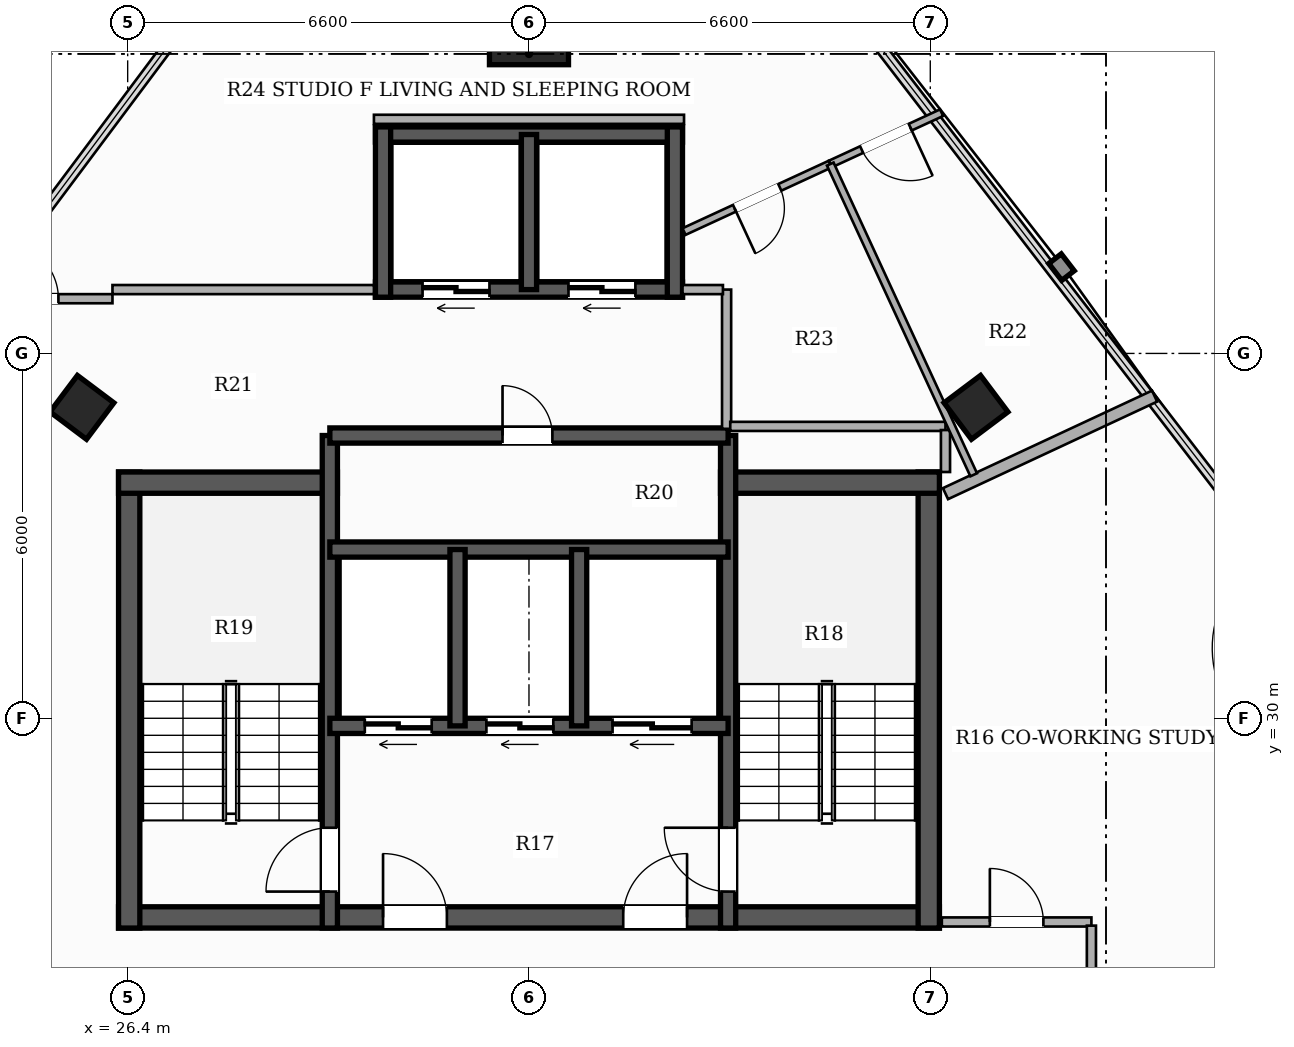
"""IFC4 building model, lengths in metres.
Left out: names, types, materials, properties, quantities, classifications, styles, units other than length and angle.
Written with IfcOpenShell. Run it as: python <this file> out.ifc"""

import sys

from ifc_helpers import new_model, si_unit, direction, frame, frame_2d, origin, origin_2d, place, context, subcontext, project, spatial, rectangle, hollow_rectangle, extrude, element, fill, save


model = new_model("IFC4")
c1 = context("Model", 3, precision=1e-05, world=origin(), true_north=direction((0.0, 1.0)))
c2 = subcontext(c1, "Body", "Model", "MODEL_VIEW")
j1 = project(units=[si_unit("LENGTHUNIT", "METRE"), si_unit("PLANEANGLEUNIT", "RADIAN")], contexts=[c1])
p1 = place(None, origin())
s1 = spatial("IfcSite", under=j1, at=p1, CompositionType="ELEMENT")
p2 = place(p1, origin())
s2 = spatial("IfcBuilding", under=s1, at=p2, CompositionType="ELEMENT")
p3 = place(p2, frame((0.0, 0.0, 196.4)))
s3 = spatial("IfcBuildingStorey", under=s2, at=p3, CompositionType="ELEMENT", Elevation=196.4)
p4 = place(p3, frame((26.25, 26.725, 0.0), z_axis=(0.0, 0.0, 1.0), x_axis=(1.0, 0.0, 0.0)))
e1 = element("IfcWall", 1, at=p4, inside=s3, PredefinedType="SHEAR", context=c2, shape_type="SweptSolid", body=[
    extrude(rectangle(XDim=13.5, YDim=0.35, at=frame_2d((6.75, 0.0))), origin(), (0.0, 0.0, 1.0), 3.3),
])
p5 = place(p4, frame((4.35, 0.0, 0.0)))
e2 = element("IfcOpeningElement", 2, at=p5, cuts=e1, PredefinedType="OPENING", context=c2, shape_type="SweptSolid", body=[
    extrude(rectangle(XDim=1.05, YDim=2.15, at=frame_2d((0.525, 1.075))), frame((0.0, 0.185, 0.0), z_axis=(0.0, -1.0, 0.0), x_axis=(1.0, 0.0, 0.0)), (0.0, 0.0, 1.0), 0.37),
])
p6 = place(p4, frame((8.3, 0.0, 0.0)))
e3 = element("IfcOpeningElement", 3, at=p6, cuts=e1, PredefinedType="OPENING", context=c2, shape_type="SweptSolid", body=[
    extrude(rectangle(XDim=1.05, YDim=2.15, at=frame_2d((0.525, 1.075))), frame((0.0, 0.185, 0.0), z_axis=(0.0, -1.0, 0.0), x_axis=(1.0, 0.0, 0.0)), (0.0, 0.0, 1.0), 0.37),
])
p7 = place(p3, frame((26.425, 26.55, 0.0), z_axis=(0.0, 0.0, 1.0), x_axis=(0.0, 1.0, 0.0)))
e4 = element("IfcWall", 4, at=p7, inside=s3, PredefinedType="SHEAR", context=c2, shape_type="SweptSolid", body=[
    extrude(rectangle(XDim=7.5, YDim=0.35, at=frame_2d((3.75, 0.0))), origin(), (0.0, 0.0, 1.0), 3.3),
])
p8 = place(p3, frame((26.25, 33.875, 0.0), z_axis=(0.0, 0.0, 1.0), x_axis=(1.0, 0.0, 0.0)))
e5 = element("IfcWall", 5, at=p8, inside=s3, PredefinedType="SHEAR", context=c2, shape_type="SweptSolid", body=[
    extrude(rectangle(XDim=3.6, YDim=0.35, at=frame_2d((1.8, 0.0))), origin(), (0.0, 0.0, 1.0), 3.3),
])
p9 = place(p3, frame((39.575, 26.55, 0.0), z_axis=(0.0, 0.0, 1.0), x_axis=(0.0, 1.0, 0.0)))
e6 = element("IfcWall", 6, at=p9, inside=s3, PredefinedType="SHEAR", context=c2, shape_type="SweptSolid", body=[
    extrude(rectangle(XDim=7.5, YDim=0.35, at=frame_2d((3.75, 0.0))), origin(), (0.0, 0.0, 1.0), 3.3),
])
p10 = place(p3, frame((36.15, 33.875, 0.0), z_axis=(0.0, 0.0, 1.0), x_axis=(1.0, 0.0, 0.0)))
e7 = element("IfcWall", 7, at=p10, inside=s3, PredefinedType="SHEAR", context=c2, shape_type="SweptSolid", body=[
    extrude(rectangle(XDim=3.6, YDim=0.35, at=frame_2d((1.8, 0.0))), origin(), (0.0, 0.0, 1.0), 3.3),
])
p11 = place(p3, frame((29.725, 26.55, 0.0), z_axis=(0.0, 0.0, 1.0), x_axis=(0.0, 1.0, 0.0)))
e8 = element("IfcWall", 8, at=p11, inside=s3, PredefinedType="SHEAR", context=c2, shape_type="SweptSolid", body=[
    extrude(rectangle(XDim=8.1, YDim=0.25, at=frame_2d((4.05, 0.0))), origin(), (0.0, 0.0, 1.0), 3.3),
])
p12 = place(p11, frame((0.6, 0.0, 0.0)))
e9 = element("IfcOpeningElement", 9, at=p12, cuts=e8, PredefinedType="OPENING", context=c2, shape_type="SweptSolid", body=[
    extrude(rectangle(XDim=1.05, YDim=2.15, at=frame_2d((0.525, 1.075))), frame((0.0, 0.135, 0.0), z_axis=(0.0, -1.0, 0.0), x_axis=(1.0, 0.0, 0.0)), (0.0, 0.0, 1.0), 0.27),
])
p13 = place(p3, frame((36.275, 26.55, 0.0), z_axis=(0.0, 0.0, 1.0), x_axis=(0.0, 1.0, 0.0)))
e10 = element("IfcWall", 10, at=p13, inside=s3, PredefinedType="SHEAR", context=c2, shape_type="SweptSolid", body=[
    extrude(rectangle(XDim=8.1, YDim=0.25, at=frame_2d((4.05, 0.0))), origin(), (0.0, 0.0, 1.0), 3.3),
])
p14 = place(p13, frame((0.6, 0.0, 0.0)))
e11 = element("IfcOpeningElement", 11, at=p14, cuts=e10, PredefinedType="OPENING", context=c2, shape_type="SweptSolid", body=[
    extrude(rectangle(XDim=1.05, YDim=2.15, at=frame_2d((0.525, 1.075))), frame((0.0, 0.135, 0.0), z_axis=(0.0, -1.0, 0.0), x_axis=(1.0, 0.0, 0.0)), (0.0, 0.0, 1.0), 0.27),
])
p15 = place(p3, frame((36.275, 29.875, 0.0), z_axis=(0.0, 0.0, 1.0), x_axis=(-1.0, 0.0, 0.0)))
e12 = element("IfcWall", 12, at=p15, inside=s3, PredefinedType="SHEAR", context=c2, shape_type="SweptSolid", body=[
    extrude(rectangle(XDim=6.55, YDim=0.25, at=frame_2d((3.275, 0.0))), origin(), (0.0, 0.0, 1.0), 3.3),
])
p16 = place(p15, frame((4.875, 0.0, 0.0)))
e13 = element("IfcOpeningElement", 13, at=p16, cuts=e12, PredefinedType="OPENING", context=c2, shape_type="SweptSolid", body=[
    extrude(rectangle(XDim=1.1, YDim=2.2, at=frame_2d((0.55, 1.1))), frame((0.0, 0.135, 0.0), z_axis=(0.0, -1.0, 0.0), x_axis=(1.0, 0.0, 0.0)), (0.0, 0.0, 1.0), 0.27),
])
p17 = place(p15, frame((2.875, 0.0, 0.0)))
e14 = element("IfcOpeningElement", 14, at=p17, cuts=e12, PredefinedType="OPENING", context=c2, shape_type="SweptSolid", body=[
    extrude(rectangle(XDim=1.1, YDim=2.2, at=frame_2d((0.55, 1.1))), frame((0.0, 0.135, 0.0), z_axis=(0.0, -1.0, 0.0), x_axis=(1.0, 0.0, 0.0)), (0.0, 0.0, 1.0), 0.27),
])
p18 = place(p15, frame((0.6, 0.0, 0.0)))
e15 = element("IfcOpeningElement", 15, at=p18, cuts=e12, PredefinedType="OPENING", context=c2, shape_type="SweptSolid", body=[
    extrude(rectangle(XDim=1.3, YDim=2.2, at=frame_2d((0.65, 1.1))), frame((0.0, 0.135, 0.0), z_axis=(0.0, -1.0, 0.0), x_axis=(1.0, 0.0, 0.0)), (0.0, 0.0, 1.0), 0.27),
])
p19 = place(p3, frame((29.725, 32.775, 0.0), z_axis=(0.0, 0.0, 1.0), x_axis=(1.0, 0.0, 0.0)))
e16 = element("IfcWall", 16, at=p19, inside=s3, PredefinedType="SHEAR", context=c2, shape_type="SweptSolid", body=[
    extrude(rectangle(XDim=6.55, YDim=0.25, at=frame_2d((3.275, 0.0))), origin(), (0.0, 0.0, 1.0), 3.3),
])
for number, where, z_axis, x_axis in (
    (17, (31.825, 29.875, 0.0), (0.0, 0.0, 1.0), (0.0, 1.0, 0.0)),
    (18, (33.825, 29.875, 0.0), (0.0, 0.0, 1.0), (0.0, 1.0, 0.0)),
):
    element("IfcWall", number, at=place(p3, frame(where, z_axis=z_axis, x_axis=x_axis)), inside=s3, PredefinedType="SHEAR", context=c2, shape_type="SweptSolid", body=[
        extrude(rectangle(XDim=2.9, YDim=0.25, at=frame_2d((1.45, 0.0))), origin(), (0.0, 0.0, 1.0), 3.3),
    ])
p20 = place(p3, frame((29.725, 34.65, 0.0), z_axis=(0.0, 0.0, 1.0), x_axis=(1.0, 0.0, 0.0)))
e19 = element("IfcWall", 19, at=p20, inside=s3, PredefinedType="SHEAR", context=c2, shape_type="SweptSolid", body=[
    extrude(rectangle(XDim=6.55, YDim=0.25, at=frame_2d((3.275, 0.0))), origin(), (0.0, 0.0, 1.0), 3.3),
])
p21 = place(p20, frame((2.84, 0.0, 0.0)))
e20 = element("IfcOpeningElement", 20, at=p21, cuts=e19, PredefinedType="OPENING", context=c2, shape_type="SweptSolid", body=[
    extrude(rectangle(XDim=0.82, YDim=2.1, at=frame_2d((0.41, 1.05))), frame((0.0, 0.135, 0.0), z_axis=(0.0, -1.0, 0.0), x_axis=(1.0, 0.0, 0.0)), (0.0, 0.0, 1.0), 0.27),
])
p22 = place(p3, frame((35.525, 37.05, 0.0), z_axis=(0.0, 0.0, 1.0), x_axis=(-1.0, 0.0, 0.0)))
e21 = element("IfcWall", 21, at=p22, inside=s3, PredefinedType="SHEAR", context=c2, shape_type="SweptSolid", body=[
    extrude(rectangle(XDim=5.05, YDim=0.25, at=frame_2d((2.525, 0.0))), origin(), (0.0, 0.0, 1.0), 3.3),
])
p23 = place(p22, frame((3.175, 0.0, 0.0)))
e22 = element("IfcOpeningElement", 22, at=p23, cuts=e21, PredefinedType="OPENING", context=c2, shape_type="SweptSolid", body=[
    extrude(rectangle(XDim=1.1, YDim=2.2, at=frame_2d((0.55, 1.1))), frame((0.0, 0.135, 0.0), z_axis=(0.0, -1.0, 0.0), x_axis=(1.0, 0.0, 0.0)), (0.0, 0.0, 1.0), 0.27),
])
p24 = place(p22, frame((0.775, 0.0, 0.0)))
e23 = element("IfcOpeningElement", 23, at=p24, cuts=e21, PredefinedType="OPENING", context=c2, shape_type="SweptSolid", body=[
    extrude(rectangle(XDim=1.1, YDim=2.2, at=frame_2d((0.55, 1.1))), frame((0.0, 0.135, 0.0), z_axis=(0.0, -1.0, 0.0), x_axis=(1.0, 0.0, 0.0)), (0.0, 0.0, 1.0), 0.27),
])
p25 = place(p3, frame((30.475, 39.6, 0.0), z_axis=(0.0, 0.0, 1.0), x_axis=(1.0, 0.0, 0.0)))
e24 = element("IfcWall", 24, at=p25, inside=s3, PredefinedType="SHEAR", context=c2, shape_type="SweptSolid", body=[
    extrude(rectangle(XDim=5.05, YDim=0.25, at=frame_2d((2.525, 0.0))), origin(), (0.0, 0.0, 1.0), 3.3),
])
for number, where, z_axis, x_axis in (
    (25, (30.6, 36.925, 0.0), (0.0, 0.0, 1.0), (0.0, 1.0, 0.0)),
    (26, (35.4, 36.925, 0.0), (0.0, 0.0, 1.0), (0.0, 1.0, 0.0)),
):
    element("IfcWall", number, at=place(p3, frame(where, z_axis=z_axis, x_axis=x_axis)), inside=s3, PredefinedType="SHEAR", context=c2, shape_type="SweptSolid", body=[
        extrude(rectangle(XDim=2.8, YDim=0.25, at=frame_2d((1.4, 0.0))), origin(), (0.0, 0.0, 1.0), 3.3),
    ])
p26 = place(p3, frame((33.0, 37.05, 0.0), z_axis=(0.0, 0.0, 1.0), x_axis=(0.0, 1.0, 0.0)))
e27 = element("IfcWall", 27, at=p26, inside=s3, PredefinedType="SHEAR", context=c2, shape_type="SweptSolid", body=[
    extrude(rectangle(XDim=2.55, YDim=0.25, at=frame_2d((1.275, 0.0))), origin(), (0.0, 0.0, 1.0), 3.3),
])
p27 = place(p3, frame((33.0, 41.398, 0.0), z_axis=(0.0, 0.0, 1.0), x_axis=(1.0, 0.0, 0.0)))
e28 = element("IfcColumn", 28, at=p27, inside=s3, PredefinedType="COLUMN", context=c2, shape_type="SweptSolid", body=[
    extrude(hollow_rectangle(XDim=1.3, YDim=1.3, WallThickness=0.04, at=origin_2d()), origin(), (0.0, 0.0, 1.0), 3.3),
])
for number, where, z_axis, x_axis in (
    (29, (25.648, 35.113, 0.0), (0.0, 0.0, 1.0), (0.6, 0.8, 0.0)),
    (30, (40.352, 35.113, 0.0), (0.0, 0.0, 1.0), (-0.6, 0.8, 0.0)),
):
    element("IfcColumn", number, at=place(p3, frame(where, z_axis=z_axis, x_axis=x_axis)), inside=s3, PredefinedType="COLUMN", context=c2, shape_type="SweptSolid", body=[
        extrude(hollow_rectangle(XDim=0.75, YDim=0.75, WallThickness=0.025, at=origin_2d()), origin(), (0.0, 0.0, 1.0), 3.3),
    ])
p28 = place(p3, frame((36.25, 34.76, 0.0), z_axis=(0.0, 0.0, 1.0), x_axis=(0.0, 1.0, 0.0)))
e31 = element("IfcWall", 31, at=p28, inside=s3, PredefinedType="PARTITIONING", context=c2, shape_type="SweptSolid", body=[
    extrude(rectangle(XDim=2.29, YDim=0.15, at=frame_2d((1.145, 0.0))), origin(), (0.0, 0.0, 1.0), 2.425),
])
p29 = place(p3, frame((35.525, 37.05, 0.0), z_axis=(0.0, 0.0, 1.0), x_axis=(1.0, 0.0, 0.0)))
e32 = element("IfcWall", 32, at=p29, inside=s3, PredefinedType="PARTITIONING", context=c2, shape_type="SweptSolid", body=[
    extrude(rectangle(XDim=0.665, YDim=0.15, at=frame_2d((0.333, 0.0))), origin(), (0.0, 0.0, 1.0), 2.425),
])
p30 = place(p3, frame((23.831, 36.9, 0.0), z_axis=(0.0, 0.0, 1.0), x_axis=(1.0, 0.0, 0.0)))
e33 = element("IfcWall", 33, at=p30, inside=s3, PredefinedType="PARTITIONING", context=c2, shape_type="SweptSolid", body=[
    extrude(rectangle(XDim=2.319, YDim=0.15, at=frame_2d((1.159, 0.0))), origin(), (0.0, 0.0, 1.0), 2.619),
])
p31 = place(p30, frame((0.51, 0.0, 0.0)))
e34 = element("IfcOpeningElement", 34, at=p31, cuts=e33, PredefinedType="OPENING", context=c2, shape_type="SweptSolid", body=[
    extrude(rectangle(XDim=0.92, YDim=2.15, at=frame_2d((0.46, 1.075))), frame((0.0, 0.085, 0.0), z_axis=(0.0, -1.0, 0.0), x_axis=(1.0, 0.0, 0.0)), (0.0, 0.0, 1.0), 0.17),
])
p32 = place(p3, frame((39.79, 26.65, 0.0), z_axis=(0.0, 0.0, 1.0), x_axis=(1.0, 0.0, 0.0)))
e35 = element("IfcWall", 35, at=p32, inside=s3, PredefinedType="PARTITIONING", context=c2, shape_type="SweptSolid", body=[
    extrude(rectangle(XDim=2.46, YDim=0.15, at=frame_2d((1.23, 0.0))), origin(), (0.0, 0.0, 1.0), 2.565),
])
p33 = place(p32, frame((0.79, 0.0, 0.0)))
e36 = element("IfcOpeningElement", 36, at=p33, cuts=e35, PredefinedType="OPENING", context=c2, shape_type="SweptSolid", body=[
    extrude(rectangle(XDim=0.88, YDim=2.1, at=frame_2d((0.44, 1.05))), frame((0.0, 0.085, 0.0), z_axis=(0.0, -1.0, 0.0), x_axis=(1.0, 0.0, 0.0)), (0.0, 0.0, 1.0), 0.17),
])
p34 = place(p3, frame((42.25, 26.59, 0.0), z_axis=(0.0, 0.0, 1.0), x_axis=(0.0, -1.0, 0.0)))
e37 = element("IfcWall", 37, at=p34, inside=s3, PredefinedType="PARTITIONING", context=c2, shape_type="SweptSolid", body=[
    extrude(rectangle(XDim=2.74, YDim=0.15, at=frame_2d((1.37, 0.0))), origin(), (0.0, 0.0, 1.0), 2.773),
])
p35 = place(p3, frame((26.15, 37.05, 0.0), z_axis=(0.0, 0.0, 1.0), x_axis=(1.0, 0.0, 0.0)))
e38 = element("IfcWall", 38, at=p35, inside=s3, PredefinedType="PARTITIONING", context=c2, shape_type="SweptSolid", body=[
    extrude(rectangle(XDim=4.3, YDim=0.15, at=frame_2d((2.15, 0.0))), origin(), (0.0, 0.0, 1.0), 2.425),
])
p36 = place(p3, frame((30.45, 39.85, 0.0), z_axis=(0.0, 0.0, 1.0), x_axis=(1.0, 0.0, 0.0)))
e39 = element("IfcWall", 39, at=p36, inside=s3, PredefinedType="PARTITIONING", context=c2, shape_type="SweptSolid", body=[
    extrude(rectangle(XDim=5.1, YDim=0.15, at=frame_2d((2.55, 0.0))), origin(), (0.0, 0.0, 1.0), 2.492),
])
p37 = place(p3, frame((36.31, 34.8, 0.0), z_axis=(0.0, 0.0, 1.0), x_axis=(1.0, 0.0, 0.0)))
e40 = element("IfcWall", 40, at=p37, inside=s3, PredefinedType="PARTITIONING", context=c2, shape_type="SweptSolid", body=[
    extrude(rectangle(XDim=3.54, YDim=0.15, at=frame_2d((1.77, 0.0))), origin(), (0.0, 0.0, 1.0), 2.425),
])
p38 = place(p3, frame((39.85, 34.74, 0.0), z_axis=(0.0, 0.0, 1.0), x_axis=(0.0, -1.0, 0.0)))
e41 = element("IfcWall", 41, at=p38, inside=s3, PredefinedType="PARTITIONING", context=c2, shape_type="SweptSolid", body=[
    extrude(rectangle(XDim=0.69, YDim=0.15, at=frame_2d((0.345, 0.0))), origin(), (0.0, 0.0, 1.0), 2.773),
])
p39 = place(p3, frame((43.289, 35.298, 0.0), z_axis=(0.0, 0.0, 1.0), x_axis=(-0.906268592738, -0.422702304011, 0.0)))
e42 = element("IfcWall", 42, at=p39, inside=s3, PredefinedType="PARTITIONING", context=c2, shape_type="SweptSolid", body=[
    extrude(rectangle(XDim=3.795, YDim=0.2, at=frame_2d((1.897, 0.0))), origin(), (0.0, 0.0, 1.0), 2.492),
])
p40 = place(p3, frame((37.955, 39.114, 0.0), z_axis=(0.0, 0.0, 1.0), x_axis=(-0.907945896046, -0.41908740121, 0.0)))
e43 = element("IfcWall", 43, at=p40, inside=s3, PredefinedType="PARTITIONING", context=c2, shape_type="SweptSolid", body=[
    extrude(rectangle(XDim=2.649, YDim=0.12, at=frame_2d((1.324, 0.0))), origin(), (0.0, 0.0, 1.0), 2.492),
])
p41 = place(p40, frame((0.914, 0.0, 0.0)))
e44 = element("IfcOpeningElement", 44, at=p41, cuts=e43, PredefinedType="OPENING", context=c2, shape_type="SweptSolid", body=[
    extrude(rectangle(XDim=0.82, YDim=2.1, at=frame_2d((0.41, 1.05))), frame((0.0, 0.07, 0.0), z_axis=(0.0, -1.0, 0.0), x_axis=(1.0, 0.0, 0.0)), (0.0, 0.0, 1.0), 0.14),
])
p42 = place(p3, frame((39.786, 39.959, 0.0), z_axis=(0.0, 0.0, 1.0), x_axis=(-0.90796292821, -0.419050499338, 0.0)))
e45 = element("IfcWall", 45, at=p42, inside=s3, PredefinedType="PARTITIONING", context=c2, shape_type="SweptSolid", body=[
    extrude(rectangle(XDim=2.016, YDim=0.12, at=frame_2d((1.008, 0.0))), origin(), (0.0, 0.0, 1.0), 3.06),
])
p43 = place(p42, frame((0.568, 0.0, 0.0)))
e46 = element("IfcOpeningElement", 46, at=p43, cuts=e45, PredefinedType="OPENING", context=c2, shape_type="SweptSolid", body=[
    extrude(rectangle(XDim=0.88, YDim=2.1, at=frame_2d((0.44, 1.05))), frame((0.0, 0.07, 0.0), z_axis=(0.0, -1.0, 0.0), x_axis=(1.0, 0.0, 0.0)), (0.0, 0.0, 1.0), 0.14),
])
p44 = place(p3, frame((37.955, 39.114, 0.0), z_axis=(0.0, 0.0, 1.0), x_axis=(0.41911319203, -0.907933991139, 0.0)))
e47 = element("IfcWall", 47, at=p44, inside=s3, PredefinedType="PARTITIONING", context=c2, shape_type="SweptSolid", body=[
    extrude(rectangle(XDim=5.628, YDim=0.12, at=frame_2d((2.814, 0.0))), origin(), (0.0, 0.0, 1.0), 2.492),
])
p45 = place(p12, origin())
e48 = element("IfcDoor", 48, at=p45, inside=s3, OperationType="SINGLE_SWING_LEFT", PredefinedType="DOOR", context=c2, shape_type="SweptSolid", body=[
    extrude(rectangle(XDim=1.05, YDim=2.15, at=frame_2d((0.525, 1.075))), frame((0.0, 0.025, 0.0), z_axis=(0.0, -1.0, 0.0), x_axis=(1.0, 0.0, 0.0)), (0.0, 0.0, 1.0), 0.05),
])
fill(e9, e48)
p46 = place(p14, origin())
e49 = element("IfcDoor", 49, at=p46, inside=s3, OperationType="SINGLE_SWING_RIGHT", PredefinedType="DOOR", context=c2, shape_type="SweptSolid", body=[
    extrude(rectangle(XDim=1.05, YDim=2.15, at=frame_2d((0.525, 1.075))), frame((0.0, 0.025, 0.0), z_axis=(0.0, -1.0, 0.0), x_axis=(1.0, 0.0, 0.0)), (0.0, 0.0, 1.0), 0.05),
])
fill(e11, e49)
p47 = place(p5, origin())
e50 = element("IfcDoor", 50, at=p47, inside=s3, OperationType="SINGLE_SWING_LEFT", PredefinedType="DOOR", context=c2, shape_type="SweptSolid", body=[
    extrude(rectangle(XDim=1.05, YDim=2.15, at=frame_2d((0.525, 1.075))), frame((0.0, 0.025, 0.0), z_axis=(0.0, -1.0, 0.0), x_axis=(1.0, 0.0, 0.0)), (0.0, 0.0, 1.0), 0.05),
])
fill(e2, e50)
p48 = place(p6, origin())
e51 = element("IfcDoor", 51, at=p48, inside=s3, OperationType="SINGLE_SWING_RIGHT", PredefinedType="DOOR", context=c2, shape_type="SweptSolid", body=[
    extrude(rectangle(XDim=1.05, YDim=2.15, at=frame_2d((0.525, 1.075))), frame((0.0, 0.025, 0.0), z_axis=(0.0, -1.0, 0.0), x_axis=(1.0, 0.0, 0.0)), (0.0, 0.0, 1.0), 0.05),
])
fill(e3, e51)
p49 = place(p16, origin())
e52 = element("IfcDoor", 52, at=p49, inside=s3, OperationType="DOUBLE_DOOR_SLIDING", PredefinedType="DOOR", context=c2, shape_type="SweptSolid", body=[
    extrude(rectangle(XDim=1.1, YDim=2.2, at=frame_2d((0.55, 1.1))), frame((0.0, 0.025, 0.0), z_axis=(0.0, -1.0, 0.0), x_axis=(1.0, 0.0, 0.0)), (0.0, 0.0, 1.0), 0.05),
])
fill(e13, e52)
p50 = place(p17, origin())
e53 = element("IfcDoor", 53, at=p50, inside=s3, OperationType="DOUBLE_DOOR_SLIDING", PredefinedType="DOOR", context=c2, shape_type="SweptSolid", body=[
    extrude(rectangle(XDim=1.1, YDim=2.2, at=frame_2d((0.55, 1.1))), frame((0.0, 0.025, 0.0), z_axis=(0.0, -1.0, 0.0), x_axis=(1.0, 0.0, 0.0)), (0.0, 0.0, 1.0), 0.05),
])
fill(e14, e53)
p51 = place(p18, origin())
e54 = element("IfcDoor", 54, at=p51, inside=s3, OperationType="DOUBLE_DOOR_SLIDING", PredefinedType="DOOR", context=c2, shape_type="SweptSolid", body=[
    extrude(rectangle(XDim=1.3, YDim=2.2, at=frame_2d((0.65, 1.1))), frame((0.0, 0.025, 0.0), z_axis=(0.0, -1.0, 0.0), x_axis=(1.0, 0.0, 0.0)), (0.0, 0.0, 1.0), 0.05),
])
fill(e15, e54)
p52 = place(p23, origin())
e55 = element("IfcDoor", 55, at=p52, inside=s3, OperationType="DOUBLE_DOOR_SLIDING", PredefinedType="DOOR", context=c2, shape_type="SweptSolid", body=[
    extrude(rectangle(XDim=1.1, YDim=2.2, at=frame_2d((0.55, 1.1))), frame((0.0, 0.025, 0.0), z_axis=(0.0, -1.0, 0.0), x_axis=(1.0, 0.0, 0.0)), (0.0, 0.0, 1.0), 0.05),
])
fill(e22, e55)
p53 = place(p24, origin())
e56 = element("IfcDoor", 56, at=p53, inside=s3, OperationType="DOUBLE_DOOR_SLIDING", PredefinedType="DOOR", context=c2, shape_type="SweptSolid", body=[
    extrude(rectangle(XDim=1.1, YDim=2.2, at=frame_2d((0.55, 1.1))), frame((0.0, 0.025, 0.0), z_axis=(0.0, -1.0, 0.0), x_axis=(1.0, 0.0, 0.0)), (0.0, 0.0, 1.0), 0.05),
])
fill(e23, e56)
p54 = place(p21, origin())
e57 = element("IfcDoor", 57, at=p54, inside=s3, OperationType="SINGLE_SWING_LEFT", PredefinedType="DOOR", context=c2, shape_type="SweptSolid", body=[
    extrude(rectangle(XDim=0.82, YDim=2.1, at=frame_2d((0.41, 1.05))), frame((0.0, 0.025, 0.0), z_axis=(0.0, -1.0, 0.0), x_axis=(1.0, 0.0, 0.0)), (0.0, 0.0, 1.0), 0.05),
])
fill(e20, e57)
p55 = place(p31, origin())
e58 = element("IfcDoor", 58, at=p55, inside=s3, OperationType="SINGLE_SWING_LEFT", PredefinedType="DOOR", context=c2, shape_type="SweptSolid", body=[
    extrude(rectangle(XDim=0.92, YDim=2.15, at=frame_2d((0.46, 1.075))), frame((0.0, 0.025, 0.0), z_axis=(0.0, -1.0, 0.0), x_axis=(1.0, 0.0, 0.0)), (0.0, 0.0, 1.0), 0.05),
])
fill(e34, e58)
p56 = place(p41, origin())
e59 = element("IfcDoor", 59, at=p56, inside=s3, OperationType="SINGLE_SWING_RIGHT", PredefinedType="DOOR", context=c2, shape_type="SweptSolid", body=[
    extrude(rectangle(XDim=0.82, YDim=2.1, at=frame_2d((0.41, 1.05))), frame((0.0, 0.025, 0.0), z_axis=(0.0, -1.0, 0.0), x_axis=(1.0, 0.0, 0.0)), (0.0, 0.0, 1.0), 0.05),
])
fill(e44, e59)
p57 = place(p43, origin())
e60 = element("IfcDoor", 60, at=p57, inside=s3, OperationType="SINGLE_SWING_LEFT", PredefinedType="DOOR", context=c2, shape_type="SweptSolid", body=[
    extrude(rectangle(XDim=0.88, YDim=2.1, at=frame_2d((0.44, 1.05))), frame((0.0, 0.025, 0.0), z_axis=(0.0, -1.0, 0.0), x_axis=(1.0, 0.0, 0.0)), (0.0, 0.0, 1.0), 0.05),
])
fill(e46, e60)
p58 = place(p33, origin())
e61 = element("IfcDoor", 61, at=p58, inside=s3, OperationType="SINGLE_SWING_LEFT", PredefinedType="DOOR", context=c2, shape_type="SweptSolid", body=[
    extrude(rectangle(XDim=0.88, YDim=2.1, at=frame_2d((0.44, 1.05))), frame((0.0, 0.025, 0.0), z_axis=(0.0, -1.0, 0.0), x_axis=(1.0, 0.0, 0.0)), (0.0, 0.0, 1.0), 0.05),
])
fill(e36, e61)
save(model, sys.argv[1])
